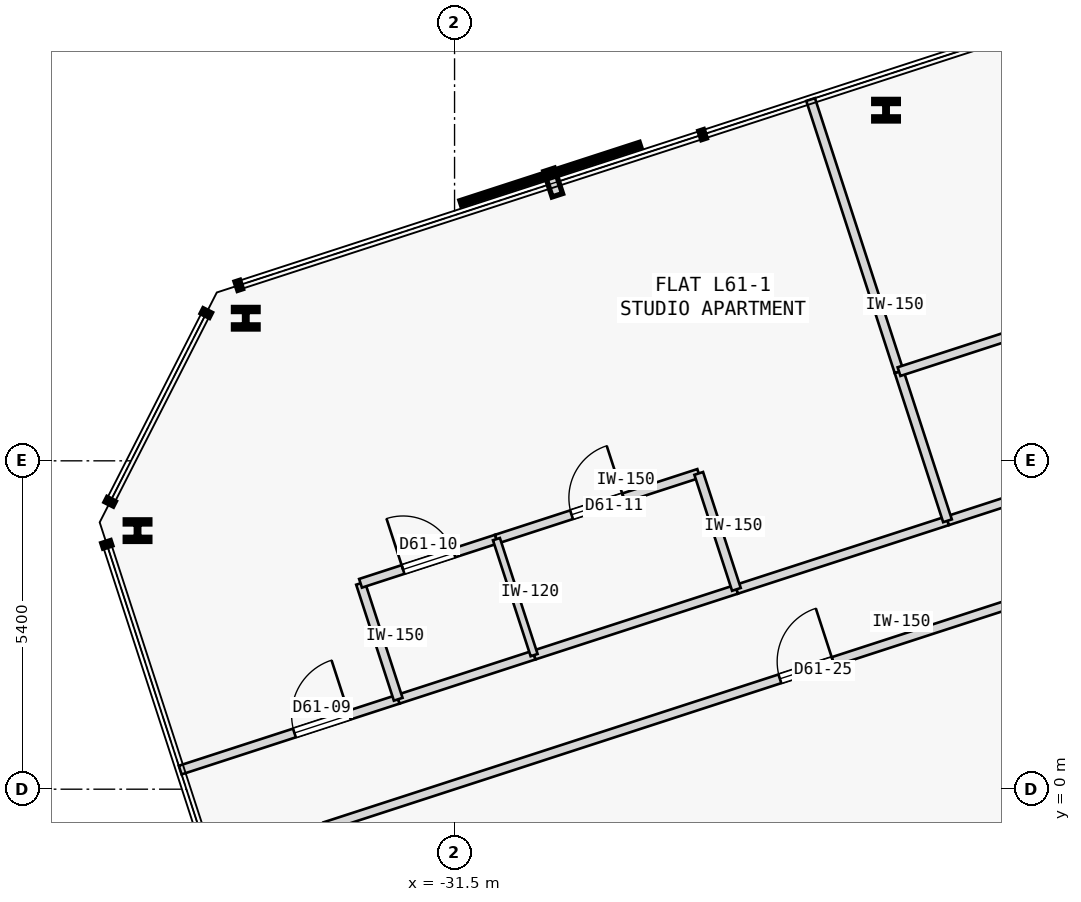
"""IFC4 building model, lengths in metres.
Left out: names, types, materials, properties, quantities, classifications, styles, units other than length and angle.
Written with IfcOpenShell. Run it as: python <this file> out.ifc"""

import sys

from ifc_helpers import new_model, si_unit, direction, frame, frame_2d, origin, origin_2d, place, context, subcontext, project, spatial, rectangle, i_section, extrude, element, fill, save


model = new_model("IFC4")
c1 = context("Model", 3, precision=1e-05, world=origin(), true_north=direction((0.0, 1.0)))
c2 = subcontext(c1, "Body", "Model", "MODEL_VIEW")
j1 = project(units=[si_unit("LENGTHUNIT", "METRE"), si_unit("PLANEANGLEUNIT", "RADIAN")], contexts=[c1])
p1 = place(None, origin())
s1 = spatial("IfcSite", under=j1, at=p1, CompositionType="ELEMENT")
p2 = place(p1, origin())
s2 = spatial("IfcBuilding", under=s1, at=p2, CompositionType="ELEMENT")
p3 = place(p2, frame((0.0, 0.0, 231.0)))
s3 = spatial("IfcBuildingStorey", under=s2, at=p3, CompositionType="ELEMENT", Elevation=231.0)
for number, where, z_axis, x_axis in (
    (1, (-24.404, 11.166, 0.0), (0.0, 0.0, 1.0), (1.0, 0.0, 0.0)),
    (2, (-34.934, 7.745, 0.0), (0.0, 0.0, 1.0), (1.0, 0.0, 0.0)),
    (3, (-36.713, 4.252, 0.0), (0.0, 0.0, 1.0), (1.0, 0.0, 0.0)),
):
    element("IfcColumn", number, at=place(p3, frame(where, z_axis=z_axis, x_axis=x_axis)), inside=s3, PredefinedType="COLUMN", context=c2, shape_type="SweptSolid", body=[
        extrude(i_section(OverallWidth=0.405, OverallDepth=0.355, WebThickness=0.042, FlangeThickness=0.068, FilletRadius=0.015, at=origin_2d()), origin(), (0.0, 0.0, 1.0), 3.35),
    ])
p4 = place(p3, frame((-36.012, 0.314, 0.0), z_axis=(0.0, 0.0, 1.0), x_axis=(0.951071182868, 0.308971851659, 0.0)))
e4 = element("IfcWall", 4, at=p4, inside=s3, PredefinedType="PARTITIONING", context=c2, shape_type="SweptSolid", body=[
    extrude(rectangle(XDim=3.77, YDim=0.15, at=frame_2d((1.885, 0.0))), origin(), (0.0, 0.0, 1.0), 3.125),
])
p5 = place(p4, frame((1.976, 0.0, 0.0)))
e5 = element("IfcOpeningElement", 5, at=p5, cuts=e4, PredefinedType="OPENING", context=c2, shape_type="SweptSolid", body=[
    extrude(rectangle(XDim=0.95, YDim=2.15, at=frame_2d((0.475, 1.075))), frame((0.0, 0.085, 0.0), z_axis=(0.0, -1.0, 0.0), x_axis=(1.0, 0.0, 0.0)), (0.0, 0.0, 1.0), 0.17),
])
p6 = place(p3, frame((-26.865, 3.286, 0.0), z_axis=(0.0, 0.0, 1.0), x_axis=(0.951057168147, 0.309014988174, 0.0)))
e6 = element("IfcWall", 6, at=p6, inside=s3, PredefinedType="PARTITIONING", context=c2, shape_type="SweptSolid", body=[
    extrude(rectangle(XDim=3.65, YDim=0.15, at=frame_2d((1.825, 0.0))), origin(), (0.0, 0.0, 1.0), 3.125),
])
p7 = place(p3, frame((-32.427, 1.479, 0.0), z_axis=(0.0, 0.0, 1.0), x_axis=(0.951045519245, 0.309050837767, 0.0)))
e7 = element("IfcWall", 7, at=p7, inside=s3, PredefinedType="PARTITIONING", context=c2, shape_type="SweptSolid", body=[
    extrude(rectangle(XDim=2.35, YDim=0.15, at=frame_2d((1.175, 0.0))), origin(), (0.0, 0.0, 1.0), 3.125),
])
p8 = place(p3, frame((-30.192, 2.205, 0.0), z_axis=(0.0, 0.0, 1.0), x_axis=(0.951063814176, 0.308994532905, 0.0)))
e8 = element("IfcWall", 8, at=p8, inside=s3, PredefinedType="PARTITIONING", context=c2, shape_type="SweptSolid", body=[
    extrude(rectangle(XDim=3.498, YDim=0.15, at=frame_2d((1.749, 0.0))), origin(), (0.0, 0.0, 1.0), 3.125),
])
p9 = place(p3, frame((-33.633, -0.616, 0.0), z_axis=(0.0, 0.0, 1.0), x_axis=(0.951058192995, 0.309011833974, 0.0)))
e9 = element("IfcWall", 9, at=p9, inside=s3, PredefinedType="PARTITIONING", context=c2, shape_type="SweptSolid", body=[
    extrude(rectangle(XDim=16.657, YDim=0.15, at=frame_2d((8.329, 0.0))), origin(), (0.0, 0.0, 1.0), 3.125),
])
p10 = place(p9, frame((7.868, 0.0, 0.0)))
e10 = element("IfcOpeningElement", 10, at=p10, cuts=e9, PredefinedType="OPENING", context=c2, shape_type="SweptSolid", body=[
    extrude(rectangle(XDim=0.92, YDim=2.15, at=frame_2d((0.46, 1.075))), frame((0.0, 0.085, 0.0), z_axis=(0.0, -1.0, 0.0), x_axis=(1.0, 0.0, 0.0)), (0.0, 0.0, 1.0), 0.17),
])
p11 = place(p3, frame((-23.394, 4.414, 0.0), z_axis=(0.0, 0.0, 1.0), x_axis=(0.951050121956, 0.309036673434, 0.0)))
e11 = element("IfcWall", 11, at=p11, inside=s3, PredefinedType="PARTITIONING", context=c2, shape_type="SweptSolid", body=[
    extrude(rectangle(XDim=5.364, YDim=0.15, at=frame_2d((2.682, 0.0))), origin(), (0.0, 0.0, 1.0), 3.125),
])
p12 = place(p11, frame((2.222, 0.0, 0.0)))
e12 = element("IfcOpeningElement", 12, at=p12, cuts=e11, PredefinedType="OPENING", context=c2, shape_type="SweptSolid", body=[
    extrude(rectangle(XDim=0.92, YDim=2.15, at=frame_2d((0.46, 1.075))), frame((0.0, 0.085, 0.0), z_axis=(0.0, -1.0, 0.0), x_axis=(1.0, 0.0, 0.0)), (0.0, 0.0, 1.0), 0.17),
])
p13 = place(p3, frame((-32.427, 1.479, 0.0), z_axis=(0.0, 0.0, 1.0), x_axis=(-0.309022749039, 0.951054646472, 0.0)))
e13 = element("IfcWall", 13, at=p13, inside=s3, PredefinedType="PARTITIONING", context=c2, shape_type="SweptSolid", body=[
    extrude(rectangle(XDim=2.005, YDim=0.15, at=frame_2d((1.002, 0.0))), origin(), (0.0, 0.0, 1.0), 3.125),
])
p14 = place(p3, frame((-33.046, 3.386, 0.0), z_axis=(0.0, 0.0, 1.0), x_axis=(0.951045519245, 0.309050837767, 0.0)))
e14 = element("IfcWall", 14, at=p14, inside=s3, PredefinedType="PARTITIONING", context=c2, shape_type="SweptSolid", body=[
    extrude(rectangle(XDim=2.35, YDim=0.15, at=frame_2d((1.175, 0.0))), origin(), (0.0, 0.0, 1.0), 3.125),
])
p15 = place(p14, frame((0.735, 0.0, 0.0)))
e15 = element("IfcOpeningElement", 15, at=p15, cuts=e14, PredefinedType="OPENING", context=c2, shape_type="SweptSolid", body=[
    extrude(rectangle(XDim=0.88, YDim=2.15, at=frame_2d((0.44, 1.075))), frame((0.0, 0.085, 0.0), z_axis=(0.0, -1.0, 0.0), x_axis=(1.0, 0.0, 0.0)), (0.0, 0.0, 1.0), 0.17),
])
p16 = place(p3, frame((-30.811, 4.112, 0.0), z_axis=(0.0, 0.0, 1.0), x_axis=(0.951063814176, 0.308994532905, 0.0)))
e16 = element("IfcWall", 16, at=p16, inside=s3, PredefinedType="PARTITIONING", context=c2, shape_type="SweptSolid", body=[
    extrude(rectangle(XDim=3.498, YDim=0.15, at=frame_2d((1.749, 0.0))), origin(), (0.0, 0.0, 1.0), 3.125),
])
p17 = place(p16, frame((1.299, 0.0, 0.0)))
e17 = element("IfcOpeningElement", 17, at=p17, cuts=e16, PredefinedType="OPENING", context=c2, shape_type="SweptSolid", body=[
    extrude(rectangle(XDim=0.9, YDim=2.15, at=frame_2d((0.45, 1.075))), frame((0.0, 0.085, 0.0), z_axis=(0.0, -1.0, 0.0), x_axis=(1.0, 0.0, 0.0)), (0.0, 0.0, 1.0), 0.17),
])
p18 = place(p3, frame((-26.865, 3.286, 0.0), z_axis=(0.0, 0.0, 1.0), x_axis=(-0.309022749039, 0.951054646472, 0.0)))
e18 = element("IfcWall", 18, at=p18, inside=s3, PredefinedType="PARTITIONING", context=c2, shape_type="SweptSolid", body=[
    extrude(rectangle(XDim=2.005, YDim=0.15, at=frame_2d((1.002, 0.0))), origin(), (0.0, 0.0, 1.0), 3.125),
])
p19 = place(p3, frame((-23.394, 4.414, 0.0), z_axis=(0.0, 0.0, 1.0), x_axis=(-0.308976906612, 0.951069540665, 0.0)))
e19 = element("IfcWall", 19, at=p19, inside=s3, PredefinedType="PARTITIONING", context=c2, shape_type="SweptSolid", body=[
    extrude(rectangle(XDim=2.579, YDim=0.15, at=frame_2d((1.29, 0.0))), origin(), (0.0, 0.0, 1.0), 3.125),
])
p20 = place(p3, frame((-24.19, 6.867, 0.0), z_axis=(0.0, 0.0, 1.0), x_axis=(-0.309057912466, 0.951043220228, 0.0)))
e20 = element("IfcWall", 20, at=p20, inside=s3, PredefinedType="PARTITIONING", context=c2, shape_type="SweptSolid", body=[
    extrude(rectangle(XDim=4.705, YDim=0.15, at=frame_2d((2.353, 0.0))), origin(), (0.0, 0.0, 1.0), 3.125),
])
p21 = place(p3, frame((-30.192, 2.205, 0.0), z_axis=(0.0, 0.0, 1.0), x_axis=(-0.309022749039, 0.951054646472, 0.0)))
e21 = element("IfcWall", 21, at=p21, inside=s3, PredefinedType="PARTITIONING", context=c2, shape_type="SweptSolid", body=[
    extrude(rectangle(XDim=2.005, YDim=0.12, at=frame_2d((1.002, 0.0))), origin(), (0.0, 0.0, 1.0), 3.125),
])
p22 = place(p3, frame((-32.179, -5.093, 0.0), z_axis=(0.0, 0.0, 1.0), x_axis=(0.951053885426, 0.309025091239, 0.0)))
e22 = element("IfcWall", 22, at=p22, inside=s3, PredefinedType="PARTITIONING", context=c2, shape_type="SweptSolid", body=[
    extrude(rectangle(XDim=16.657, YDim=0.15, at=frame_2d((8.329, 0.0))), origin(), (0.0, 0.0, 1.0), 3.125),
])
p23 = place(p3, frame((-24.19, 6.867, 0.0), z_axis=(0.0, 0.0, 1.0), x_axis=(0.951059152206, 0.309008881758, 0.0)))
e23 = element("IfcWall", 23, at=p23, inside=s3, PredefinedType="PARTITIONING", context=c2, shape_type="SweptSolid", body=[
    extrude(rectangle(XDim=5.364, YDim=0.15, at=frame_2d((2.682, 0.0))), origin(), (0.0, 0.0, 1.0), 3.125),
])
p24 = place(p23, frame((2.222, 0.0, 0.0)))
e24 = element("IfcOpeningElement", 24, at=p24, cuts=e23, PredefinedType="OPENING", context=c2, shape_type="SweptSolid", body=[
    extrude(rectangle(XDim=0.92, YDim=2.15, at=frame_2d((0.46, 1.075))), frame((0.0, 0.085, 0.0), z_axis=(0.0, -1.0, 0.0), x_axis=(1.0, 0.0, 0.0)), (0.0, 0.0, 1.0), 0.17),
])
p25 = place(p5, origin())
e25 = element("IfcDoor", 25, at=p25, inside=s3, OperationType="SINGLE_SWING_RIGHT", PredefinedType="DOOR", context=c2, shape_type="SweptSolid", body=[
    extrude(rectangle(XDim=0.95, YDim=2.15, at=frame_2d((0.475, 1.075))), frame((0.0, 0.025, 0.0), z_axis=(0.0, -1.0, 0.0), x_axis=(1.0, 0.0, 0.0)), (0.0, 0.0, 1.0), 0.05),
])
fill(e5, e25)
p26 = place(p15, origin())
e26 = element("IfcDoor", 26, at=p26, inside=s3, OperationType="SINGLE_SWING_LEFT", PredefinedType="DOOR", context=c2, shape_type="SweptSolid", body=[
    extrude(rectangle(XDim=0.88, YDim=2.15, at=frame_2d((0.44, 1.075))), frame((0.0, 0.025, 0.0), z_axis=(0.0, -1.0, 0.0), x_axis=(1.0, 0.0, 0.0)), (0.0, 0.0, 1.0), 0.05),
])
fill(e15, e26)
p27 = place(p17, origin())
e27 = element("IfcDoor", 27, at=p27, inside=s3, OperationType="SINGLE_SWING_RIGHT", PredefinedType="DOOR", context=c2, shape_type="SweptSolid", body=[
    extrude(rectangle(XDim=0.9, YDim=2.15, at=frame_2d((0.45, 1.075))), frame((0.0, 0.025, 0.0), z_axis=(0.0, -1.0, 0.0), x_axis=(1.0, 0.0, 0.0)), (0.0, 0.0, 1.0), 0.05),
])
fill(e17, e27)
p28 = place(p10, origin())
e28 = element("IfcDoor", 28, at=p28, inside=s3, OperationType="SINGLE_SWING_RIGHT", PredefinedType="DOOR", context=c2, shape_type="SweptSolid", body=[
    extrude(rectangle(XDim=0.92, YDim=2.15, at=frame_2d((0.46, 1.075))), frame((0.0, 0.025, 0.0), z_axis=(0.0, -1.0, 0.0), x_axis=(1.0, 0.0, 0.0)), (0.0, 0.0, 1.0), 0.05),
])
fill(e10, e28)
save(model, sys.argv[1])
